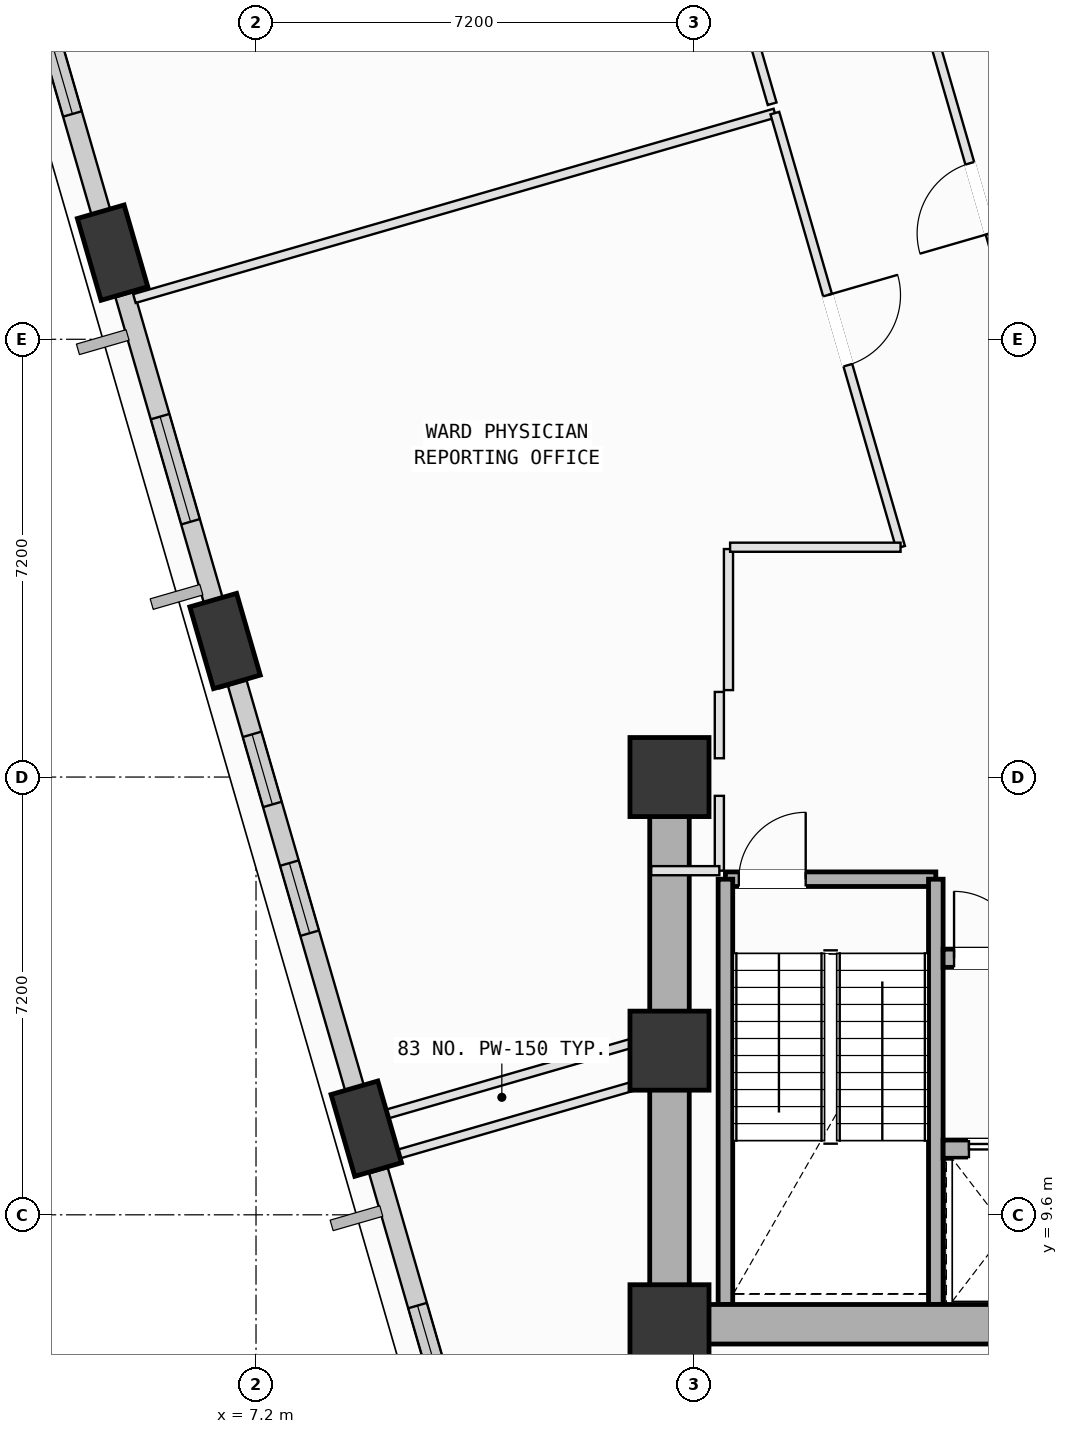
"""IFC4 building model, lengths in metres.
Left out: names, types, materials, properties, quantities, classifications, styles, units other than length and angle.
Written with IfcOpenShell. Run it as: python <this file> out.ifc"""

import sys

from ifc_helpers import new_model, si_unit, direction, frame, frame_2d, origin, origin_2d, place, context, subcontext, project, spatial, rectangle, extrude, element, fill, save


model = new_model("IFC4")
c1 = context("Model", 3, precision=1e-05, world=origin(), true_north=direction((0.0, 1.0)))
c2 = subcontext(c1, "Body", "Model", "MODEL_VIEW")
j1 = project(units=[si_unit("LENGTHUNIT", "METRE"), si_unit("PLANEANGLEUNIT", "RADIAN")], contexts=[c1])
p1 = place(None, origin())
s1 = spatial("IfcSite", under=j1, at=p1, CompositionType="ELEMENT")
p2 = place(p1, origin())
s2 = spatial("IfcBuilding", under=s1, at=p2, CompositionType="ELEMENT")
p3 = place(p2, frame((0.0, 0.0, 92.4)))
s3 = spatial("IfcBuildingStorey", under=s2, at=p3, CompositionType="ELEMENT", Elevation=92.4)
for number, where, z_axis, x_axis in (
    (1, (14.0, 7.8, 0.0), (0.0, 0.0, 1.0), (1.0, 0.0, 0.0)),
    (2, (14.0, 12.3, 0.0), (0.0, 0.0, 1.0), (1.0, 0.0, 0.0)),
    (3, (14.0, 16.8, 0.0), (0.0, 0.0, 1.0), (1.0, 0.0, 0.0)),
):
    element("IfcColumn", number, at=place(p3, frame(where, z_axis=z_axis, x_axis=x_axis)), inside=s3, PredefinedType="COLUMN", context=c2, shape_type="SweptSolid", body=[
        extrude(rectangle(XDim=1.3, YDim=1.3, at=origin_2d()), origin(), (0.0, 0.0, 1.0), 4.0),
    ])
p4 = place(p3, frame((4.841, 25.425, 0.002), z_axis=(-0.001577202956, -0.118350883349, 0.992970584077), x_axis=(-0.265418805981, 0.957406566821, 0.11369047119)))
e4 = element("IfcColumn", 4, at=p4, inside=s3, PredefinedType="COLUMN", context=c2, shape_type="SweptSolid", body=[
    extrude(rectangle(XDim=1.4, YDim=0.8, at=origin_2d()), origin(), (0.0, 0.0, 1.0), 4.025),
])
p5 = place(p3, frame((6.691, 19.038, 0.002), z_axis=(0.024643094895, -0.110651137915, 0.993553744672), x_axis=(-0.478960573088, 0.871056875124, 0.108888427883)))
e5 = element("IfcColumn", 5, at=p5, inside=s3, PredefinedType="COLUMN", context=c2, shape_type="SweptSolid", body=[
    extrude(rectangle(XDim=1.4, YDim=0.8, at=origin_2d()), origin(), (0.0, 0.0, 1.0), 4.022),
])
p6 = place(p3, frame((9.013, 11.017, 0.002), z_axis=(0.057583895371, -0.100726308024, 0.993246347019), x_axis=(-0.714979934027, 0.690205417785, 0.111445839753)))
e6 = element("IfcColumn", 6, at=p6, inside=s3, PredefinedType="COLUMN", context=c2, shape_type="SweptSolid", body=[
    extrude(rectangle(XDim=1.4, YDim=0.8, at=origin_2d()), origin(), (0.0, 0.0, 1.0), 4.023),
])
p7 = place(p3, frame((4.768, 25.678, 0.0), z_axis=(0.0, 0.0, 1.0), x_axis=(-0.278117063401, 0.960547187308, 0.0)))
e7 = element("IfcWall", 7, at=p7, inside=s3, PredefinedType="SOLIDWALL", context=c2, shape_type="SweptSolid", body=[
    extrude(rectangle(XDim=5.628, YDim=0.32, at=frame_2d((2.814, 0.0))), origin(), (0.0, 0.0, 1.0), 3.165),
])
p8 = place(p7, frame((2.111, 0.0, 0.75)))
e8 = element("IfcOpeningElement", 8, at=p8, cuts=e7, PredefinedType="OPENING", context=c2, shape_type="SweptSolid", body=[
    extrude(rectangle(XDim=1.4, YDim=1.85, at=frame_2d((0.7, 0.925))), frame((0.0, 0.17, 0.0), z_axis=(0.0, -1.0, 0.0), x_axis=(1.0, 0.0, 0.0)), (0.0, 0.0, 1.0), 0.34),
])
p9 = place(p3, frame((6.616, 19.295, 0.0), z_axis=(0.0, 0.0, 1.0), x_axis=(-0.278153347747, 0.960536680787, 0.0)))
e9 = element("IfcWall", 9, at=p9, inside=s3, PredefinedType="SOLIDWALL", context=c2, shape_type="SweptSolid", body=[
    extrude(rectangle(XDim=5.662, YDim=0.32, at=frame_2d((2.831, 0.0))), origin(), (0.0, 0.0, 1.0), 3.165),
])
p10 = place(p9, frame((1.773, 0.0, 0.75)))
e10 = element("IfcOpeningElement", 10, at=p10, cuts=e9, PredefinedType="OPENING", context=c2, shape_type="SweptSolid", body=[
    extrude(rectangle(XDim=1.8, YDim=2.05, at=frame_2d((0.9, 1.025))), frame((0.0, 0.17, 0.0), z_axis=(0.0, -1.0, 0.0), x_axis=(1.0, 0.0, 0.0)), (0.0, 0.0, 1.0), 0.34),
])
p11 = place(p3, frame((8.939, 11.273, 0.0), z_axis=(0.0, 0.0, 1.0), x_axis=(-0.27816277732, 0.96053395011, 0.0)))
e11 = element("IfcWall", 11, at=p11, inside=s3, PredefinedType="SOLIDWALL", context=c2, shape_type="SweptSolid", body=[
    extrude(rectangle(XDim=7.36, YDim=0.32, at=frame_2d((3.68, 0.0))), origin(), (0.0, 0.0, 1.0), 3.165),
])
p12 = place(p11, frame((3.081, 0.0, 0.75)))
e12 = element("IfcOpeningElement", 12, at=p12, cuts=e11, PredefinedType="OPENING", context=c2, shape_type="SweptSolid", body=[
    extrude(rectangle(XDim=1.2, YDim=1.75, at=frame_2d((0.6, 0.875))), frame((0.0, 0.17, 0.0), z_axis=(0.0, -1.0, 0.0), x_axis=(1.0, 0.0, 0.0)), (0.0, 0.0, 1.0), 0.34),
])
p13 = place(p11, frame((5.285, 0.0, 0.75)))
e13 = element("IfcOpeningElement", 13, at=p13, cuts=e11, PredefinedType="OPENING", context=c2, shape_type="SweptSolid", body=[
    extrude(rectangle(XDim=1.2, YDim=1.75, at=frame_2d((0.6, 0.875))), frame((0.0, 0.17, 0.0), z_axis=(0.0, -1.0, 0.0), x_axis=(1.0, 0.0, 0.0)), (0.0, 0.0, 1.0), 0.34),
])
p14 = place(p3, frame((10.945, 4.347, 0.0), z_axis=(0.0, 0.0, 1.0), x_axis=(-0.278128561381, 0.960543858106, 0.0)))
e14 = element("IfcWall", 14, at=p14, inside=s3, PredefinedType="SOLIDWALL", context=c2, shape_type="SweptSolid", body=[
    extrude(rectangle(XDim=6.224, YDim=0.32, at=frame_2d((3.112, 0.0))), origin(), (0.0, 0.0, 1.0), 3.165),
])
p15 = place(p14, frame((2.314, 0.0, 0.75)))
e15 = element("IfcOpeningElement", 15, at=p15, cuts=e14, PredefinedType="OPENING", context=c2, shape_type="SweptSolid", body=[
    extrude(rectangle(XDim=1.6, YDim=1.95, at=frame_2d((0.8, 0.975))), frame((0.0, 0.17, 0.0), z_axis=(0.0, -1.0, 0.0), x_axis=(1.0, 0.0, 0.0)), (0.0, 0.0, 1.0), 0.34),
])
p16 = place(p3, frame((14.92, 15.12, 0.0), z_axis=(0.0, 0.0, 1.0), x_axis=(1.0, 0.0, 0.0)))
e16 = element("IfcWall", 16, at=p16, inside=s3, PredefinedType="SOLIDWALL", context=c2, shape_type="SweptSolid", body=[
    extrude(rectangle(XDim=3.46, YDim=0.24, at=frame_2d((1.73, 0.0))), origin(), (0.0, 0.0, 1.0), 3.78),
])
p17 = place(p16, frame((0.22, 0.0, 0.0)))
e17 = element("IfcOpeningElement", 17, at=p17, cuts=e16, PredefinedType="OPENING", context=c2, shape_type="SweptSolid", body=[
    extrude(rectangle(XDim=1.1, YDim=2.15, at=frame_2d((0.55, 1.075))), frame((0.0, 0.13, 0.0), z_axis=(0.0, -1.0, 0.0), x_axis=(1.0, 0.0, 0.0)), (0.0, 0.0, 1.0), 0.26),
])
for number, where, z_axis, x_axis in (
    (18, (18.38, 15.12, 0.0), (0.0, 0.0, 1.0), (0.0, -1.0, 0.0)),
    (19, (14.92, 8.125, 0.0), (0.0, 0.0, 1.0), (0.0, 1.0, 0.0)),
):
    element("IfcWall", number, at=place(p3, frame(where, z_axis=z_axis, x_axis=x_axis)), inside=s3, PredefinedType="SOLIDWALL", context=c2, shape_type="SweptSolid", body=[
        extrude(rectangle(XDim=6.995, YDim=0.24, at=frame_2d((3.498, 0.0))), origin(), (0.0, 0.0, 1.0), 3.78),
    ])
p18 = place(p3, frame((14.0, 7.8, 0.0), z_axis=(0.0, 0.0, 1.0), x_axis=(1.0, 0.0, 0.0)))
e20 = element("IfcWall", 20, at=p18, inside=s3, PredefinedType="SHEAR", context=c2, shape_type="SweptSolid", body=[
    extrude(rectangle(XDim=10.8, YDim=0.65, at=frame_2d((5.4, 0.0))), origin(), (0.0, 0.0, 1.0), 3.78),
])
p19 = place(p3, frame((14.0, 16.8, 0.0), z_axis=(0.0, 0.0, 1.0), x_axis=(0.0, -1.0, 0.0)))
e21 = element("IfcWall", 21, at=p19, inside=s3, PredefinedType="SHEAR", context=c2, shape_type="SweptSolid", body=[
    extrude(rectangle(XDim=9.0, YDim=0.65, at=frame_2d((4.5, 0.0))), origin(), (0.0, 0.0, 1.0), 3.78),
])
p20 = place(p3, frame((18.5, 10.68, 0.0), z_axis=(0.0, 0.0, 1.0), x_axis=(1.0, 0.0, 0.0)))
e22 = element("IfcWall", 22, at=p20, inside=s3, PredefinedType="SOLIDWALL", context=c2, shape_type="SweptSolid", body=[
    extrude(rectangle(XDim=5.3, YDim=0.3, at=frame_2d((2.65, 0.0))), origin(), (0.0, 0.0, 1.0), 3.78),
])
p21 = place(p20, frame((4.22, 0.0, 0.0)))
e23 = element("IfcOpeningElement", 23, at=p21, cuts=e22, PredefinedType="OPENING", context=c2, shape_type="SweptSolid", body=[
    extrude(rectangle(XDim=0.86, YDim=2.06, at=frame_2d((0.43, 1.03))), frame((0.0, 0.16, 0.0), z_axis=(0.0, -1.0, 0.0), x_axis=(1.0, 0.0, 0.0)), (0.0, 0.0, 1.0), 0.32),
])
p22 = place(p20, frame((0.425, 0.0, 0.0)))
e24 = element("IfcOpeningElement", 24, at=p22, cuts=e22, PredefinedType="OPENING", context=c2, shape_type="SweptSolid", body=[
    extrude(rectangle(XDim=1.25, YDim=2.18, at=frame_2d((0.625, 1.09))), frame((0.0, 0.16, 0.0), z_axis=(0.0, -1.0, 0.0), x_axis=(1.0, 0.0, 0.0)), (0.0, 0.0, 1.0), 0.32),
])
p23 = place(p20, frame((2.525, 0.0, 0.0)))
e25 = element("IfcOpeningElement", 25, at=p23, cuts=e22, PredefinedType="OPENING", context=c2, shape_type="SweptSolid", body=[
    extrude(rectangle(XDim=1.25, YDim=2.18, at=frame_2d((0.625, 1.09))), frame((0.0, 0.16, 0.0), z_axis=(0.0, -1.0, 0.0), x_axis=(1.0, 0.0, 0.0)), (0.0, 0.0, 1.0), 0.32),
])
p24 = place(p3, frame((18.5, 13.82, 0.0), z_axis=(0.0, 0.0, 1.0), x_axis=(1.0, 0.0, 0.0)))
e26 = element("IfcWall", 26, at=p24, inside=s3, PredefinedType="SOLIDWALL", context=c2, shape_type="SweptSolid", body=[
    extrude(rectangle(XDim=5.3, YDim=0.3, at=frame_2d((2.65, 0.0))), origin(), (0.0, 0.0, 1.0), 3.78),
])
p25 = place(p24, frame((0.18, 0.0, 0.0)))
e27 = element("IfcOpeningElement", 27, at=p25, cuts=e26, PredefinedType="OPENING", context=c2, shape_type="SweptSolid", body=[
    extrude(rectangle(XDim=1.1, YDim=2.15, at=frame_2d((0.55, 1.075))), frame((0.0, 0.16, 0.0), z_axis=(0.0, -1.0, 0.0), x_axis=(1.0, 0.0, 0.0)), (0.0, 0.0, 1.0), 0.32),
])
p26 = place(p3, frame((9.022, 10.447, 0.0), z_axis=(0.0, 0.0, 1.0), x_axis=(0.960518799293, 0.278215089822, 0.0)))
e28 = element("IfcWall", 28, at=p26, inside=s3, PredefinedType="PARTITIONING", context=c2, shape_type="SweptSolid", body=[
    extrude(rectangle(XDim=4.87, YDim=0.15, at=frame_2d((2.435, 0.0))), origin(), (0.0, 0.0, 1.0), 2.965),
])
p27 = place(p3, frame((14.97, 20.55, 0.0), z_axis=(0.0, 0.0, 1.0), x_axis=(0.0, -1.0, 0.0)))
e29 = element("IfcWall", 29, at=p27, inside=s3, PredefinedType="PARTITIONING", context=c2, shape_type="SweptSolid", body=[
    extrude(rectangle(XDim=2.32, YDim=0.15, at=frame_2d((1.16, 0.0))), origin(), (0.0, 0.0, 1.0), 2.965),
])
p28 = place(p3, frame((14.82, 18.2, 0.0), z_axis=(0.0, 0.0, 1.0), x_axis=(0.0, -1.0, 0.0)))
e30 = element("IfcWall", 30, at=p28, inside=s3, PredefinedType="PARTITIONING", context=c2, shape_type="SweptSolid", body=[
    extrude(rectangle(XDim=1.091, YDim=0.15, at=frame_2d((0.545, 0.0))), origin(), (0.0, 0.0, 1.0), 3.78),
])
p29 = place(p3, frame((14.82, 16.491, 0.0), z_axis=(0.0, 0.0, 1.0), x_axis=(0.0, -1.0, 0.0)))
e31 = element("IfcWall", 31, at=p29, inside=s3, PredefinedType="PARTITIONING", context=c2, shape_type="SweptSolid", body=[
    extrude(rectangle(XDim=1.231, YDim=0.15, at=frame_2d((0.615, 0.0))), origin(), (0.0, 0.0, 1.0), 3.78),
])
p30 = place(p3, frame((14.82, 15.26, 0.0), z_axis=(0.0, 0.0, 1.0), x_axis=(-1.0, 0.0, 0.0)))
e32 = element("IfcWall", 32, at=p30, inside=s3, PredefinedType="PARTITIONING", context=c2, shape_type="SweptSolid", body=[
    extrude(rectangle(XDim=1.12, YDim=0.15, at=frame_2d((0.56, 0.0))), origin(), (0.0, 0.0, 1.0), 3.78),
])
p31 = place(p3, frame((13.7, 12.515, 0.0), z_axis=(0.0, 0.0, 1.0), x_axis=(-0.960556538394, -0.278084765042, 0.0)))
e33 = element("IfcWall", 33, at=p31, inside=s3, PredefinedType="PARTITIONING", context=c2, shape_type="SweptSolid", body=[
    extrude(rectangle(XDim=4.886, YDim=0.15, at=frame_2d((2.443, 0.0))), origin(), (0.0, 0.0, 1.0), 2.965),
])
p32 = place(p3, frame((6.671, 18.279, 0.0), z_axis=(0.0, 0.0, 1.0), x_axis=(-0.278099906454, 0.960552154769, 0.0)))
e34 = element("IfcWall", 34, at=p32, inside=s3, PredefinedType="PARTITIONING", context=c2, shape_type="SweptSolid", body=[
    extrude(rectangle(XDim=0.992, YDim=0.15, at=frame_2d((0.496, 0.0))), origin(), (0.0, 0.0, 1.0), 3.165),
])
p33 = place(p3, frame((5.2, 24.67, 0.0), z_axis=(0.0, 0.0, 1.0), x_axis=(0.960539065788, 0.27814511158, 0.0)))
e35 = element("IfcWall", 35, at=p33, inside=s3, PredefinedType="PARTITIONING", context=c2, shape_type="SweptSolid", body=[
    extrude(rectangle(XDim=10.966, YDim=0.15, at=frame_2d((5.483, 0.0))), origin(), (0.0, 0.0, 1.0), 3.78),
])
p34 = place(p3, frame((15.733, 27.72, 0.0), z_axis=(0.0, 0.0, 1.0), x_axis=(0.278098749545, -0.960552489717, 0.0)))
e36 = element("IfcWall", 36, at=p34, inside=s3, PredefinedType="PARTITIONING", context=c2, shape_type="SweptSolid", body=[
    extrude(rectangle(XDim=7.433, YDim=0.15, at=frame_2d((3.717, 0.0))), origin(), (0.0, 0.0, 1.0), 3.78),
])
p35 = place(p34, frame((3.117, 0.0, 0.0)))
e37 = element("IfcOpeningElement", 37, at=p35, cuts=e36, PredefinedType="OPENING", context=c2, shape_type="SweptSolid", body=[
    extrude(rectangle(XDim=1.2, YDim=2.15, at=frame_2d((0.6, 1.075))), frame((0.0, 0.085, 0.0), z_axis=(0.0, -1.0, 0.0), x_axis=(1.0, 0.0, 0.0)), (0.0, 0.0, 1.0), 0.17),
])
p36 = place(p3, frame((17.8, 20.58, 0.0), z_axis=(0.0, 0.0, 1.0), x_axis=(-1.0, 0.0, 0.0)))
e38 = element("IfcWall", 38, at=p36, inside=s3, PredefinedType="PARTITIONING", context=c2, shape_type="SweptSolid", body=[
    extrude(rectangle(XDim=2.803, YDim=0.15, at=frame_2d((1.401, 0.0))), origin(), (0.0, 0.0, 1.0), 3.78),
])
p37 = place(p3, frame((12.45, 39.055, 0.0), z_axis=(0.0, 0.0, 1.0), x_axis=(0.278173677599, -0.960530793411, 0.0)))
e39 = element("IfcWall", 39, at=p37, inside=s3, PredefinedType="PARTITIONING", context=c2, shape_type="SweptSolid", body=[
    extrude(rectangle(XDim=11.64, YDim=0.15, at=frame_2d((5.82, 0.0))), origin(), (0.0, 0.0, 1.0), 3.78),
])
p38 = place(p37, frame((5.22, 0.0, 0.0)))
e40 = element("IfcOpeningElement", 40, at=p38, cuts=e39, PredefinedType="OPENING", context=c2, shape_type="SweptSolid", body=[
    extrude(rectangle(XDim=1.2, YDim=2.15, at=frame_2d((0.6, 1.075))), frame((0.0, 0.085, 0.0), z_axis=(0.0, -1.0, 0.0), x_axis=(1.0, 0.0, 0.0)), (0.0, 0.0, 1.0), 0.17),
])
p39 = place(p3, frame((4.805, 24.723, 0.0), z_axis=(0.0, 0.0, 1.0), x_axis=(-0.277917486975, 0.960604950244, 0.0)))
e41 = element("IfcWall", 41, at=p39, inside=s3, PredefinedType="PARTITIONING", context=c2, shape_type="SweptSolid", body=[
    extrude(rectangle(XDim=0.928, YDim=0.15, at=frame_2d((0.464, 0.0))), origin(), (0.0, 0.0, 1.0), 3.165),
])
p40 = place(p3, frame((20.004, 23.216, 0.0), z_axis=(0.0, 0.0, 1.0), x_axis=(-0.278163608181, 0.960533709499, 0.0)))
e42 = element("IfcWall", 42, at=p40, inside=s3, PredefinedType="PARTITIONING", context=c2, shape_type="SweptSolid", body=[
    extrude(rectangle(XDim=6.46, YDim=0.15, at=frame_2d((3.23, 0.0))), origin(), (0.0, 0.0, 1.0), 3.78),
])
p41 = place(p40, frame((2.63, 0.0, 0.0)))
e43 = element("IfcOpeningElement", 43, at=p41, cuts=e42, PredefinedType="OPENING", context=c2, shape_type="SweptSolid", body=[
    extrude(rectangle(XDim=1.2, YDim=2.15, at=frame_2d((0.6, 1.075))), frame((0.0, 0.085, 0.0), z_axis=(0.0, -1.0, 0.0), x_axis=(1.0, 0.0, 0.0)), (0.0, 0.0, 1.0), 0.17),
])
p42 = place(p8, origin())
e44 = element("IfcWindow", 44, at=p42, inside=s3, PartitioningType="SINGLE_PANEL", PredefinedType="WINDOW", context=c2, shape_type="SweptSolid", body=[
    extrude(rectangle(XDim=1.4, YDim=1.85, at=frame_2d((0.7, 0.925))), frame((0.0, 0.03, 0.0), z_axis=(0.0, -1.0, 0.0), x_axis=(1.0, 0.0, 0.0)), (0.0, 0.0, 1.0), 0.06),
])
fill(e8, e44)
p43 = place(p10, origin())
e45 = element("IfcWindow", 45, at=p43, inside=s3, PartitioningType="SINGLE_PANEL", PredefinedType="WINDOW", context=c2, shape_type="SweptSolid", body=[
    extrude(rectangle(XDim=1.8, YDim=2.05, at=frame_2d((0.9, 1.025))), frame((0.0, 0.03, 0.0), z_axis=(0.0, -1.0, 0.0), x_axis=(1.0, 0.0, 0.0)), (0.0, 0.0, 1.0), 0.06),
])
fill(e10, e45)
p44 = place(p12, origin())
e46 = element("IfcWindow", 46, at=p44, inside=s3, PartitioningType="SINGLE_PANEL", PredefinedType="WINDOW", context=c2, shape_type="SweptSolid", body=[
    extrude(rectangle(XDim=1.2, YDim=1.75, at=frame_2d((0.6, 0.875))), frame((0.0, 0.03, 0.0), z_axis=(0.0, -1.0, 0.0), x_axis=(1.0, 0.0, 0.0)), (0.0, 0.0, 1.0), 0.06),
])
fill(e12, e46)
p45 = place(p13, origin())
e47 = element("IfcWindow", 47, at=p45, inside=s3, PartitioningType="SINGLE_PANEL", PredefinedType="WINDOW", context=c2, shape_type="SweptSolid", body=[
    extrude(rectangle(XDim=1.2, YDim=1.75, at=frame_2d((0.6, 0.875))), frame((0.0, 0.03, 0.0), z_axis=(0.0, -1.0, 0.0), x_axis=(1.0, 0.0, 0.0)), (0.0, 0.0, 1.0), 0.06),
])
fill(e13, e47)
p46 = place(p15, origin())
e48 = element("IfcWindow", 48, at=p46, inside=s3, PartitioningType="SINGLE_PANEL", PredefinedType="WINDOW", context=c2, shape_type="SweptSolid", body=[
    extrude(rectangle(XDim=1.6, YDim=1.95, at=frame_2d((0.8, 0.975))), frame((0.0, 0.03, 0.0), z_axis=(0.0, -1.0, 0.0), x_axis=(1.0, 0.0, 0.0)), (0.0, 0.0, 1.0), 0.06),
])
fill(e15, e48)
p47 = place(p17, origin())
e49 = element("IfcDoor", 49, at=p47, inside=s3, OperationType="SINGLE_SWING_RIGHT", PredefinedType="DOOR", context=c2, shape_type="SweptSolid", body=[
    extrude(rectangle(XDim=1.1, YDim=2.15, at=frame_2d((0.55, 1.075))), frame((0.0, 0.025, 0.0), z_axis=(0.0, -1.0, 0.0), x_axis=(1.0, 0.0, 0.0)), (0.0, 0.0, 1.0), 0.05),
])
fill(e17, e49)
p48 = place(p25, origin())
e50 = element("IfcDoor", 50, at=p48, inside=s3, OperationType="SINGLE_SWING_LEFT", PredefinedType="DOOR", context=c2, shape_type="SweptSolid", body=[
    extrude(rectangle(XDim=1.1, YDim=2.15, at=frame_2d((0.55, 1.075))), frame((0.0, 0.025, 0.0), z_axis=(0.0, -1.0, 0.0), x_axis=(1.0, 0.0, 0.0)), (0.0, 0.0, 1.0), 0.05),
])
fill(e27, e50)
p49 = place(p22, origin())
e51 = element("IfcDoor", 51, at=p49, inside=s3, OperationType="DOUBLE_DOOR_SLIDING", PredefinedType="DOOR", context=c2, shape_type="SweptSolid", body=[
    extrude(rectangle(XDim=1.25, YDim=2.18, at=frame_2d((0.625, 1.09))), frame((0.0, 0.025, 0.0), z_axis=(0.0, -1.0, 0.0), x_axis=(1.0, 0.0, 0.0)), (0.0, 0.0, 1.0), 0.05),
])
fill(e24, e51)
p50 = place(p35, origin())
e52 = element("IfcDoor", 52, at=p50, inside=s3, OperationType="SINGLE_SWING_LEFT", PredefinedType="DOOR", context=c2, shape_type="SweptSolid", body=[
    extrude(rectangle(XDim=1.2, YDim=2.15, at=frame_2d((0.6, 1.075))), frame((0.0, 0.025, 0.0), z_axis=(0.0, -1.0, 0.0), x_axis=(1.0, 0.0, 0.0)), (0.0, 0.0, 1.0), 0.05),
])
fill(e37, e52)
p51 = place(p41, origin())
e53 = element("IfcDoor", 53, at=p51, inside=s3, OperationType="SINGLE_SWING_LEFT", PredefinedType="DOOR", context=c2, shape_type="SweptSolid", body=[
    extrude(rectangle(XDim=1.2, YDim=2.15, at=frame_2d((0.6, 1.075))), frame((0.0, 0.025, 0.0), z_axis=(0.0, -1.0, 0.0), x_axis=(1.0, 0.0, 0.0)), (0.0, 0.0, 1.0), 0.05),
])
fill(e43, e53)
save(model, sys.argv[1])
